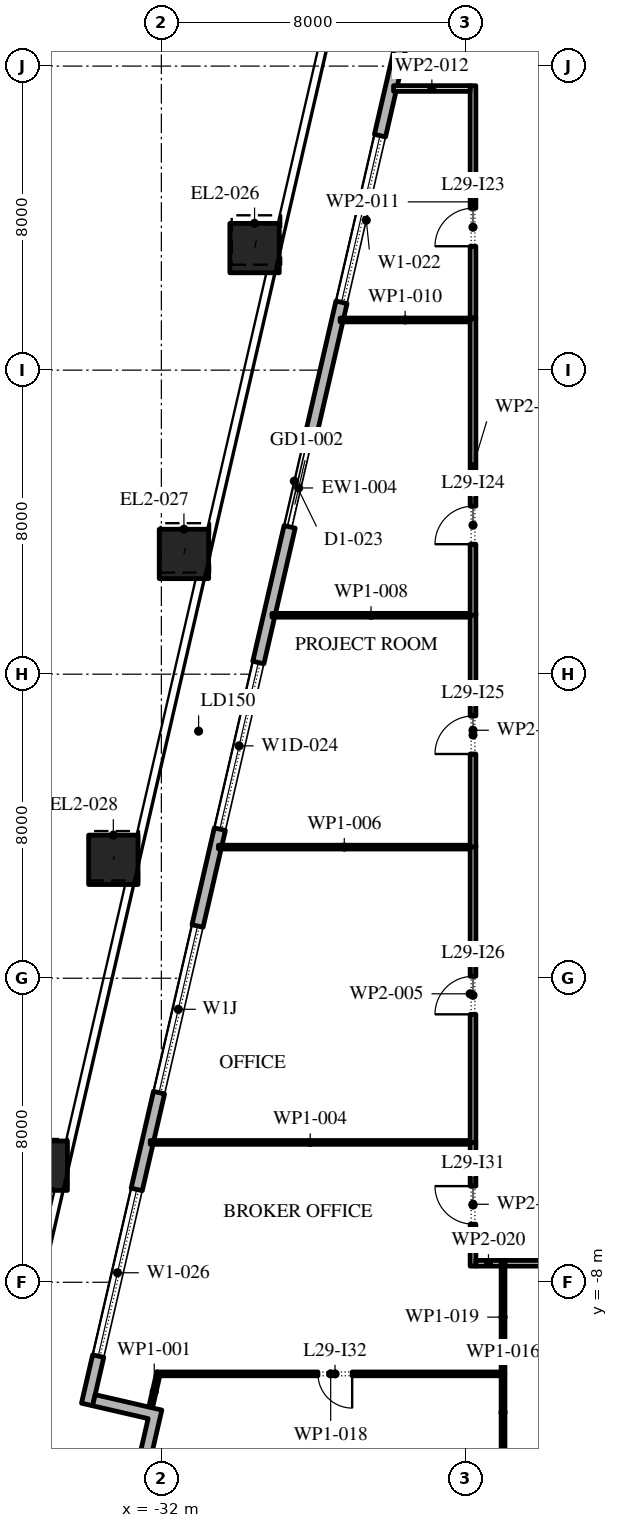
"""IFC4 building model, lengths in metres.
Left out: names, types, materials, properties, quantities, classifications, styles, units other than length and angle.
Written with IfcOpenShell. Run it as: python <this file> out.ifc"""

import sys

from ifc_helpers import new_model, si_unit, direction, frame, frame_2d, origin, origin_2d, place, context, subcontext, project, spatial, polyline, rectangle, outline, extrude, element, fill, save


model = new_model("IFC4")
c1 = context("Model", 3, precision=1e-05, world=origin(), true_north=direction((0.0, 1.0)))
c2 = subcontext(c1, "Body", "Model", "MODEL_VIEW")
j1 = project(units=[si_unit("LENGTHUNIT", "METRE"), si_unit("PLANEANGLEUNIT", "RADIAN")], contexts=[c1])
p1 = place(None, origin())
s1 = spatial("IfcSite", under=j1, at=p1, CompositionType="ELEMENT")
p2 = place(p1, origin())
s2 = spatial("IfcBuilding", under=s1, at=p2, CompositionType="ELEMENT")
p3 = place(p2, frame((0.0, 0.0, 135.0)))
s3 = spatial("IfcBuildingStorey", under=s2, at=p3, CompositionType="ELEMENT", Elevation=135.0)
p4 = place(p3, frame((-29.548, 19.212, 0.0), z_axis=(0.011668267153, 0.050562490995, 0.998652735462), x_axis=(-0.974391195695, 0.224859506699, 0.0)))
e1 = element("IfcColumn", 1, at=p4, inside=s3, PredefinedType="COLUMN", context=c2, shape_type="SweptSolid", body=[
    extrude(rectangle(XDim=1.3, YDim=1.3, at=origin_2d()), origin(), (0.0, 0.0, 1.0), 4.206),
])
p5 = place(p3, frame((-31.406, 11.164, 0.0), z_axis=(0.008770884695, 0.037929719907, 0.99924191662), x_axis=(-0.974290512438, 0.225295355862, 0.0)))
e2 = element("IfcColumn", 2, at=p5, inside=s3, PredefinedType="COLUMN", context=c2, shape_type="SweptSolid", body=[
    extrude(rectangle(XDim=1.3, YDim=1.3, at=origin_2d()), origin(), (0.0, 0.0, 1.0), 4.203),
])
p6 = place(p3, frame((-33.264, 3.115, 0.0), z_axis=(0.005810983994, 0.025277780376, 0.999663576552), x_axis=(-0.974579651079, 0.224041299099, 0.0)))
e3 = element("IfcColumn", 3, at=p6, inside=s3, PredefinedType="COLUMN", context=c2, shape_type="SweptSolid", body=[
    extrude(rectangle(XDim=1.3, YDim=1.3, at=origin_2d()), origin(), (0.0, 0.0, 1.0), 4.201),
])
p7 = place(p3, frame((-35.122, -4.933, 0.0), z_axis=(0.002906224189, 0.012671137464, 0.999915494498), x_axis=(-0.974691740237, 0.22355315143, 0.0)))
e4 = element("IfcColumn", 4, at=p7, inside=s3, PredefinedType="COLUMN", context=c2, shape_type="SweptSolid", body=[
    extrude(rectangle(XDim=1.3, YDim=1.3, at=origin_2d()), origin(), (0.0, 0.0, 1.0), 4.2),
])
p8 = place(p3, frame((-22.82, 37.016, 0.0), z_axis=(0.0, 0.0, 1.0), x_axis=(-0.224953880882, -0.974369412223, 0.0)))
e5 = element("IfcWall", 5, at=p8, inside=s3, PredefinedType="STANDARD", context=c2, shape_type="SweptSolid", body=[
    extrude(rectangle(XDim=49.5, YDim=0.3, at=frame_2d((24.75, 0.0))), origin(), (0.0, 0.0, 1.0), 4.0),
])
p9 = place(p8, frame((1.157, 0.0, 0.45)))
e6 = element("IfcOpeningElement", 6, at=p9, cuts=e5, PredefinedType="OPENING", context=c2, shape_type="SweptSolid", body=[
    extrude(rectangle(XDim=4.5, YDim=3.05, at=frame_2d((2.25, 1.525))), frame((0.0, 0.16, 0.0), z_axis=(0.0, -1.0, 0.0), x_axis=(1.0, 0.0, 0.0)), (0.0, 0.0, 1.0), 0.32),
])
p10 = place(p8, frame((8.121, 0.0, 0.45)))
e7 = element("IfcOpeningElement", 7, at=p10, cuts=e5, PredefinedType="OPENING", context=c2, shape_type="SweptSolid", body=[
    extrude(rectangle(XDim=4.5, YDim=3.05, at=frame_2d((2.25, 1.525))), frame((0.0, 0.16, 0.0), z_axis=(0.0, -1.0, 0.0), x_axis=(1.0, 0.0, 0.0)), (0.0, 0.0, 1.0), 0.32),
])
p11 = place(p8, frame((15.236, 0.0, 0.45)))
e8 = element("IfcOpeningElement", 8, at=p11, cuts=e5, PredefinedType="OPENING", context=c2, shape_type="SweptSolid", body=[
    extrude(rectangle(XDim=4.5, YDim=3.05, at=frame_2d((2.25, 1.525))), frame((0.0, 0.16, 0.0), z_axis=(0.0, -1.0, 0.0), x_axis=(1.0, 0.0, 0.0)), (0.0, 0.0, 1.0), 0.32),
])
p12 = place(p8, frame((23.4, 0.0, 0.0)))
e9 = element("IfcOpeningElement", 9, at=p12, cuts=e5, PredefinedType="OPENING", context=c2, shape_type="SweptSolid", body=[
    extrude(rectangle(XDim=2.4, YDim=3.5, at=frame_2d((1.2, 1.75))), frame((0.0, 0.16, 0.0), z_axis=(0.0, -1.0, 0.0), x_axis=(1.0, 0.0, 0.0)), (0.0, 0.0, 1.0), 0.32),
])
p13 = place(p8, frame((29.464, 0.0, 0.45)))
e10 = element("IfcOpeningElement", 10, at=p13, cuts=e5, PredefinedType="OPENING", context=c2, shape_type="SweptSolid", body=[
    extrude(rectangle(XDim=4.5, YDim=2.875, at=frame_2d((2.25, 1.438))), frame((0.0, 0.16, 0.0), z_axis=(0.0, -1.0, 0.0), x_axis=(1.0, 0.0, 0.0)), (0.0, 0.0, 1.0), 0.32),
])
p14 = place(p8, frame((36.579, 0.0, 0.45)))
e11 = element("IfcOpeningElement", 11, at=p14, cuts=e5, PredefinedType="OPENING", context=c2, shape_type="SweptSolid", body=[
    extrude(rectangle(XDim=4.5, YDim=2.675, at=frame_2d((2.25, 1.337))), frame((0.0, 0.16, 0.0), z_axis=(0.0, -1.0, 0.0), x_axis=(1.0, 0.0, 0.0)), (0.0, 0.0, 1.0), 0.32),
])
p15 = place(p8, frame((43.693, 0.0, 0.45)))
e12 = element("IfcOpeningElement", 12, at=p15, cuts=e5, PredefinedType="OPENING", context=c2, shape_type="SweptSolid", body=[
    extrude(rectangle(XDim=4.5, YDim=3.05, at=frame_2d((2.25, 1.525))), frame((0.0, 0.16, 0.0), z_axis=(0.0, -1.0, 0.0), x_axis=(1.0, 0.0, 0.0)), (0.0, 0.0, 1.0), 0.32),
])
p16 = place(p3, origin())
e13 = element("IfcWall", 13, at=p16, inside=s3, PredefinedType="STANDARD", context=c2, shape_type="SweptSolid", body=[
    extrude(outline(polyline([(-32.393, -13.116), (-30.639, -13.521), (-31.111, -15.567), (-31.404, -15.5), (-30.999, -13.746), (-32.753, -13.341), (-32.348, -11.587), (-33.809, -11.25), (-33.742, -10.957), (-31.988, -11.362), (-32.393, -13.116)])), origin(), (0.0, 0.0, 1.0), 4.0),
])
p17 = place(p3, frame((-32.069, -10.361, 0.0), z_axis=(0.0, 0.0, 1.0), x_axis=(-0.222987762652, -0.974821243976, 0.0)))
e14 = element("IfcWall", 14, at=p17, inside=s3, PredefinedType="PARTITIONING", context=c2, shape_type="SweptSolid", body=[
    extrude(rectangle(XDim=1.058, YDim=0.1, at=frame_2d((0.529, 0.0))), origin(), (0.0, 0.0, 1.0), 4.0),
])
p18 = place(p3, frame((-23.8, -7.575, 0.0), z_axis=(0.0, 0.0, 1.0), x_axis=(0.0, 1.0, 0.0)))
e15 = element("IfcWall", 15, at=p18, inside=s3, PredefinedType="PARTITIONING", context=c2, shape_type="SweptSolid", body=[
    extrude(rectangle(XDim=3.255, YDim=0.15, at=frame_2d((1.627, 0.0))), origin(), (0.0, 0.0, 1.0), 4.0),
])
p19 = place(p18, frame((1.105, 0.0, 0.0)))
e16 = element("IfcOpeningElement", 16, at=p19, cuts=e15, PredefinedType="OPENING", context=c2, shape_type="SweptSolid", body=[
    extrude(rectangle(XDim=1.0, YDim=2.1, at=frame_2d((0.5, 1.05))), frame((0.0, 0.085, 0.0), z_axis=(0.0, -1.0, 0.0), x_axis=(1.0, 0.0, 0.0)), (0.0, 0.0, 1.0), 0.17),
])
p20 = place(p3, frame((-23.875, -4.32, 0.0), z_axis=(0.0, 0.0, 1.0), x_axis=(-1.0, 0.0, 0.0)))
e17 = element("IfcWall", 17, at=p20, inside=s3, PredefinedType="PARTITIONING", context=c2, shape_type="SweptSolid", body=[
    extrude(rectangle(XDim=8.417, YDim=0.1, at=frame_2d((4.208, 0.0))), origin(), (0.0, 0.0, 1.0), 4.0),
])
p21 = place(p3, frame((-23.8, -4.32, 0.0), z_axis=(0.0, 0.0, 1.0), x_axis=(0.0, 1.0, 0.0)))
e18 = element("IfcWall", 18, at=p21, inside=s3, PredefinedType="PARTITIONING", context=c2, shape_type="SweptSolid", body=[
    extrude(rectangle(XDim=7.82, YDim=0.15, at=frame_2d((3.91, 0.0))), origin(), (0.0, 0.0, 1.0), 4.0),
])
p22 = place(p21, frame((3.37, 0.0, 0.0)))
e19 = element("IfcOpeningElement", 19, at=p22, cuts=e18, PredefinedType="OPENING", context=c2, shape_type="SweptSolid", body=[
    extrude(rectangle(XDim=1.0, YDim=2.1, at=frame_2d((0.5, 1.05))), frame((0.0, 0.085, 0.0), z_axis=(0.0, -1.0, 0.0), x_axis=(1.0, 0.0, 0.0)), (0.0, 0.0, 1.0), 0.17),
])
p23 = place(p3, frame((-23.875, 3.45, 0.0), z_axis=(0.0, 0.0, 1.0), x_axis=(-1.0, 0.0, 0.0)))
e20 = element("IfcWall", 20, at=p23, inside=s3, PredefinedType="PARTITIONING", context=c2, shape_type="SweptSolid", body=[
    extrude(rectangle(XDim=6.623, YDim=0.1, at=frame_2d((3.312, 0.0))), origin(), (0.0, 0.0, 1.0), 4.0),
])
p24 = place(p3, frame((-23.8, 3.45, 0.0), z_axis=(0.0, 0.0, 1.0), x_axis=(0.0, 1.0, 0.0)))
e21 = element("IfcWall", 21, at=p24, inside=s3, PredefinedType="PARTITIONING", context=c2, shape_type="SweptSolid", body=[
    extrude(rectangle(XDim=6.15, YDim=0.15, at=frame_2d((3.075, 0.0))), origin(), (0.0, 0.0, 1.0), 4.0),
])
p25 = place(p24, frame((2.45, 0.0, 0.0)))
e22 = element("IfcOpeningElement", 22, at=p25, cuts=e21, PredefinedType="OPENING", context=c2, shape_type="SweptSolid", body=[
    extrude(rectangle(XDim=1.0, YDim=2.1, at=frame_2d((0.5, 1.05))), frame((0.0, 0.085, 0.0), z_axis=(0.0, -1.0, 0.0), x_axis=(1.0, 0.0, 0.0)), (0.0, 0.0, 1.0), 0.17),
])
p26 = place(p3, frame((-23.875, 9.55, 0.0), z_axis=(0.0, 0.0, 1.0), x_axis=(-1.0, 0.0, 0.0)))
e23 = element("IfcWall", 23, at=p26, inside=s3, PredefinedType="PARTITIONING", context=c2, shape_type="SweptSolid", body=[
    extrude(rectangle(XDim=5.215, YDim=0.1, at=frame_2d((2.607, 0.0))), origin(), (0.0, 0.0, 1.0), 4.0),
])
p27 = place(p3, frame((-23.8, 9.55, 0.0), z_axis=(0.0, 0.0, 1.0), x_axis=(0.0, 1.0, 0.0)))
e24 = element("IfcWall", 24, at=p27, inside=s3, PredefinedType="PARTITIONING", context=c2, shape_type="SweptSolid", body=[
    extrude(rectangle(XDim=7.82, YDim=0.15, at=frame_2d((3.91, 0.0))), origin(), (0.0, 0.0, 1.0), 4.0),
])
p28 = place(p27, frame((1.87, 0.0, 0.0)))
e25 = element("IfcOpeningElement", 25, at=p28, cuts=e24, PredefinedType="OPENING", context=c2, shape_type="SweptSolid", body=[
    extrude(rectangle(XDim=1.0, YDim=2.1, at=frame_2d((0.5, 1.05))), frame((0.0, 0.085, 0.0), z_axis=(0.0, -1.0, 0.0), x_axis=(1.0, 0.0, 0.0)), (0.0, 0.0, 1.0), 0.17),
])
p29 = place(p3, frame((-23.875, 17.32, 0.0), z_axis=(0.0, 0.0, 1.0), x_axis=(-1.0, 0.0, 0.0)))
e26 = element("IfcWall", 26, at=p29, inside=s3, PredefinedType="PARTITIONING", context=c2, shape_type="SweptSolid", body=[
    extrude(rectangle(XDim=3.421, YDim=0.1, at=frame_2d((1.71, 0.0))), origin(), (0.0, 0.0, 1.0), 4.0),
])
p30 = place(p3, frame((-23.8, 17.37, 0.0), z_axis=(0.0, 0.0, 1.0), x_axis=(0.0, 1.0, 0.0)))
e27 = element("IfcWall", 27, at=p30, inside=s3, PredefinedType="PARTITIONING", context=c2, shape_type="SweptSolid", body=[
    extrude(rectangle(XDim=6.115, YDim=0.15, at=frame_2d((3.058, 0.0))), origin(), (0.0, 0.0, 1.0), 4.0),
])
p31 = place(p30, frame((1.89, 0.0, 0.0)))
e28 = element("IfcOpeningElement", 28, at=p31, cuts=e27, PredefinedType="OPENING", context=c2, shape_type="SweptSolid", body=[
    extrude(rectangle(XDim=1.0, YDim=2.1, at=frame_2d((0.5, 1.05))), frame((0.0, 0.085, 0.0), z_axis=(0.0, -1.0, 0.0), x_axis=(1.0, 0.0, 0.0)), (0.0, 0.0, 1.0), 0.17),
])
p32 = place(p3, frame((-23.875, 23.41, 0.0), z_axis=(0.0, 0.0, 1.0), x_axis=(-1.0, 0.0, 0.0)))
e29 = element("IfcWall", 29, at=p32, inside=s3, PredefinedType="PARTITIONING", context=c2, shape_type="SweptSolid", body=[
    extrude(rectangle(XDim=2.015, YDim=0.15, at=frame_2d((1.007, 0.0))), origin(), (0.0, 0.0, 1.0), 4.0),
])
p33 = place(p3, frame((-23.01, -12.45, 0.0), z_axis=(0.0, 0.0, 1.0), x_axis=(0.0, 1.0, 0.0)))
e30 = element("IfcWall", 30, at=p33, inside=s3, PredefinedType="PARTITIONING", context=c2, shape_type="SweptSolid", body=[
    extrude(rectangle(XDim=2.04, YDim=0.1, at=frame_2d((1.02, 0.0))), origin(), (0.0, 0.0, 1.0), 4.0),
])
p34 = place(p3, frame((-23.06, -10.41, 0.0), z_axis=(0.0, 0.0, 1.0), x_axis=(-1.0, 0.0, 0.0)))
e31 = element("IfcWall", 31, at=p34, inside=s3, PredefinedType="PARTITIONING", context=c2, shape_type="SweptSolid", body=[
    extrude(rectangle(XDim=8.97, YDim=0.1, at=frame_2d((4.485, 0.0))), origin(), (0.0, 0.0, 1.0), 4.0),
])
p35 = place(p34, frame((3.92, 0.0, 0.0)))
e32 = element("IfcOpeningElement", 32, at=p35, cuts=e31, PredefinedType="OPENING", context=c2, shape_type="SweptSolid", body=[
    extrude(rectangle(XDim=0.9, YDim=2.1, at=frame_2d((0.45, 1.05))), frame((0.0, 0.06, 0.0), z_axis=(0.0, -1.0, 0.0), x_axis=(1.0, 0.0, 0.0)), (0.0, 0.0, 1.0), 0.12),
])
p36 = place(p3, frame((-23.01, -10.41, 0.0), z_axis=(0.0, 0.0, 1.0), x_axis=(0.0, 1.0, 0.0)))
e33 = element("IfcWall", 33, at=p36, inside=s3, PredefinedType="PARTITIONING", context=c2, shape_type="SweptSolid", body=[
    extrude(rectangle(XDim=2.985, YDim=0.1, at=frame_2d((1.492, 0.0))), origin(), (0.0, 0.0, 1.0), 4.0),
])
p37 = place(p3, frame((-23.06, -7.5, 0.0), z_axis=(0.0, 0.0, 1.0), x_axis=(-1.0, 0.0, 0.0)))
e34 = element("IfcWall", 34, at=p37, inside=s3, PredefinedType="PARTITIONING", context=c2, shape_type="SweptSolid", body=[
    extrude(rectangle(XDim=0.665, YDim=0.15, at=frame_2d((0.333, 0.0))), origin(), (0.0, 0.0, 1.0), 4.0),
])
p38 = place(p3, frame((-13.55, -7.5, 0.0), z_axis=(0.0, 0.0, 1.0), x_axis=(-1.0, 0.0, 0.0)))
e35 = element("IfcWall", 35, at=p38, inside=s3, PredefinedType="PARTITIONING", context=c2, shape_type="SweptSolid", body=[
    extrude(rectangle(XDim=9.41, YDim=0.15, at=frame_2d((4.705, 0.0))), origin(), (0.0, 0.0, 1.0), 4.0),
])
p39 = place(p38, frame((6.06, 0.0, 0.0)))
e36 = element("IfcOpeningElement", 36, at=p39, cuts=e35, PredefinedType="OPENING", context=c2, shape_type="SweptSolid", body=[
    extrude(rectangle(XDim=1.0, YDim=2.1, at=frame_2d((0.5, 1.05))), frame((0.0, 0.085, 0.0), z_axis=(0.0, -1.0, 0.0), x_axis=(1.0, 0.0, 0.0)), (0.0, 0.0, 1.0), 0.17),
])
p40 = place(p11, origin())
e37 = element("IfcWindow", 37, at=p40, inside=s3, PartitioningType="DOUBLE_PANEL_VERTICAL", PredefinedType="WINDOW", context=c2, shape_type="SweptSolid", body=[
    extrude(rectangle(XDim=4.5, YDim=3.05, at=frame_2d((2.25, 1.525))), frame((0.0, 0.03, 0.0), z_axis=(0.0, -1.0, 0.0), x_axis=(1.0, 0.0, 0.0)), (0.0, 0.0, 1.0), 0.06),
])
fill(e8, e37)
p41 = place(p12, origin())
e38 = element("IfcDoor", 38, at=p41, inside=s3, OperationType="DOUBLE_DOOR_SLIDING", PredefinedType="DOOR", context=c2, shape_type="SweptSolid", body=[
    extrude(rectangle(XDim=2.4, YDim=3.5, at=frame_2d((1.2, 1.75))), frame((0.0, 0.025, 0.0), z_axis=(0.0, -1.0, 0.0), x_axis=(1.0, 0.0, 0.0)), (0.0, 0.0, 1.0), 0.05),
])
fill(e9, e38)
p42 = place(p13, origin())
e39 = element("IfcWindow", 39, at=p42, inside=s3, PartitioningType="DOUBLE_PANEL_VERTICAL", PredefinedType="WINDOW", context=c2, shape_type="SweptSolid", body=[
    extrude(rectangle(XDim=4.5, YDim=2.875, at=frame_2d((2.25, 1.438))), frame((0.0, 0.03, 0.0), z_axis=(0.0, -1.0, 0.0), x_axis=(1.0, 0.0, 0.0)), (0.0, 0.0, 1.0), 0.06),
])
fill(e10, e39)
p43 = place(p14, origin())
e40 = element("IfcWindow", 40, at=p43, inside=s3, PartitioningType="DOUBLE_PANEL_VERTICAL", PredefinedType="WINDOW", context=c2, shape_type="SweptSolid", body=[
    extrude(rectangle(XDim=4.5, YDim=2.675, at=frame_2d((2.25, 1.337))), frame((0.0, 0.03, 0.0), z_axis=(0.0, -1.0, 0.0), x_axis=(1.0, 0.0, 0.0)), (0.0, 0.0, 1.0), 0.06),
])
fill(e11, e40)
p44 = place(p15, origin())
e41 = element("IfcWindow", 41, at=p44, inside=s3, PartitioningType="DOUBLE_PANEL_VERTICAL", PredefinedType="WINDOW", context=c2, shape_type="SweptSolid", body=[
    extrude(rectangle(XDim=4.5, YDim=3.05, at=frame_2d((2.25, 1.525))), frame((0.0, 0.03, 0.0), z_axis=(0.0, -1.0, 0.0), x_axis=(1.0, 0.0, 0.0)), (0.0, 0.0, 1.0), 0.06),
])
fill(e12, e41)
p45 = place(p31, origin())
e42 = element("IfcDoor", 42, at=p45, inside=s3, OperationType="SINGLE_SWING_RIGHT", PredefinedType="DOOR", context=c2, shape_type="SweptSolid", body=[
    extrude(rectangle(XDim=1.0, YDim=2.1, at=frame_2d((0.5, 1.05))), frame((0.0, 0.025, 0.0), z_axis=(0.0, -1.0, 0.0), x_axis=(1.0, 0.0, 0.0)), (0.0, 0.0, 1.0), 0.05),
])
fill(e28, e42)
p46 = place(p28, origin())
e43 = element("IfcDoor", 43, at=p46, inside=s3, OperationType="SINGLE_SWING_RIGHT", PredefinedType="DOOR", context=c2, shape_type="SweptSolid", body=[
    extrude(rectangle(XDim=1.0, YDim=2.1, at=frame_2d((0.5, 1.05))), frame((0.0, 0.025, 0.0), z_axis=(0.0, -1.0, 0.0), x_axis=(1.0, 0.0, 0.0)), (0.0, 0.0, 1.0), 0.05),
])
fill(e25, e43)
p47 = place(p25, origin())
e44 = element("IfcDoor", 44, at=p47, inside=s3, OperationType="SINGLE_SWING_RIGHT", PredefinedType="DOOR", context=c2, shape_type="SweptSolid", body=[
    extrude(rectangle(XDim=1.0, YDim=2.1, at=frame_2d((0.5, 1.05))), frame((0.0, 0.025, 0.0), z_axis=(0.0, -1.0, 0.0), x_axis=(1.0, 0.0, 0.0)), (0.0, 0.0, 1.0), 0.05),
])
fill(e22, e44)
p48 = place(p22, origin())
e45 = element("IfcDoor", 45, at=p48, inside=s3, OperationType="SINGLE_SWING_RIGHT", PredefinedType="DOOR", context=c2, shape_type="SweptSolid", body=[
    extrude(rectangle(XDim=1.0, YDim=2.1, at=frame_2d((0.5, 1.05))), frame((0.0, 0.025, 0.0), z_axis=(0.0, -1.0, 0.0), x_axis=(1.0, 0.0, 0.0)), (0.0, 0.0, 1.0), 0.05),
])
fill(e19, e45)
p49 = place(p19, origin())
e46 = element("IfcDoor", 46, at=p49, inside=s3, OperationType="SINGLE_SWING_LEFT", PredefinedType="DOOR", context=c2, shape_type="SweptSolid", body=[
    extrude(rectangle(XDim=1.0, YDim=2.1, at=frame_2d((0.5, 1.05))), frame((0.0, 0.025, 0.0), z_axis=(0.0, -1.0, 0.0), x_axis=(1.0, 0.0, 0.0)), (0.0, 0.0, 1.0), 0.05),
])
fill(e16, e46)
p50 = place(p35, origin())
e47 = element("IfcDoor", 47, at=p50, inside=s3, OperationType="SINGLE_SWING_RIGHT", PredefinedType="DOOR", context=c2, shape_type="SweptSolid", body=[
    extrude(rectangle(XDim=0.9, YDim=2.1, at=frame_2d((0.45, 1.05))), frame((0.0, 0.025, 0.0), z_axis=(0.0, -1.0, 0.0), x_axis=(1.0, 0.0, 0.0)), (0.0, 0.0, 1.0), 0.05),
])
fill(e32, e47)
save(model, sys.argv[1])
